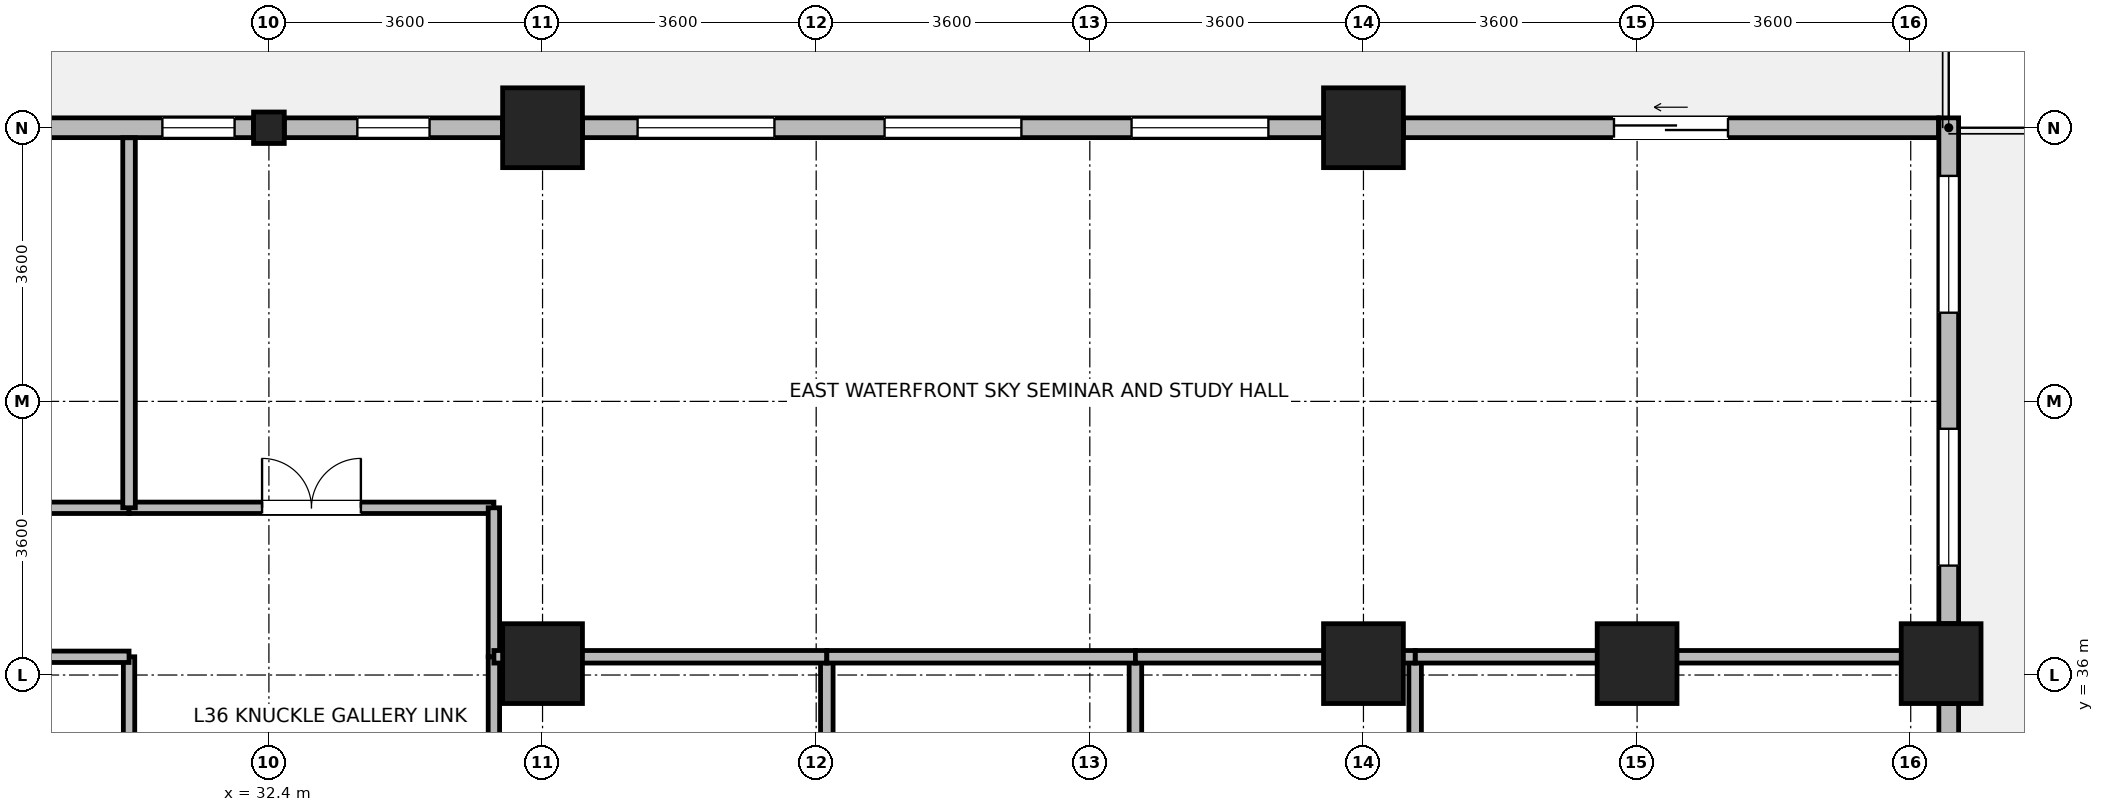
"""IFC4 building model, lengths in metres.
Left out: names, types, materials, properties, quantities, classifications, styles, units other than length and angle.
Written with IfcOpenShell. Run it as: python <this file> out.ifc"""

import sys

from ifc_helpers import new_model, si_unit, direction, frame, frame_2d, origin, origin_2d, place, context, subcontext, project, spatial, rectangle, i_section, extrude, source, transform, mapped, element, fill, save


model = new_model("IFC4")
c1 = context("Model", 3, precision=1e-05, world=origin(), true_north=direction((0.0, 1.0)))
c2 = subcontext(c1, "Body", "Model", "MODEL_VIEW")
j1 = project(units=[si_unit("LENGTHUNIT", "METRE"), si_unit("PLANEANGLEUNIT", "RADIAN")], contexts=[c1])
p1 = place(None, origin())
s1 = spatial("IfcSite", under=j1, at=p1, CompositionType="ELEMENT")
p2 = place(p1, origin())
s2 = spatial("IfcBuilding", under=s1, at=p2, CompositionType="ELEMENT")
p3 = place(p2, frame((0.0, 0.0, 143.9)))
s3 = spatial("IfcBuildingStorey", under=s2, at=p3, CompositionType="ELEMENT", Elevation=143.9)
m1 = source(origin(), c2, "Body", "SweptSolid", [
    extrude(rectangle(XDim=1.05, YDim=1.05, at=origin_2d()), origin(), (0.0, 0.0, 1.0), 3.7),
])
for number, where, z_axis, x_axis in (
    (1, (36.0, 43.2, 0.0), (0.0, 0.0, 1.0), (1.0, 0.0, 0.0)),
    (2, (36.0, 36.15, 0.0), (0.0, 0.0, 1.0), (1.0, 0.0, 0.0)),
    (3, (46.8, 36.15, 0.0), (0.0, 0.0, 1.0), (1.0, 0.0, 0.0)),
    (4, (46.8, 43.2, 0.0), (0.0, 0.0, 1.0), (1.0, 0.0, 0.0)),
    (5, (50.4, 36.15, 0.0), (0.0, 0.0, 1.0), (1.0, 0.0, 0.0)),
    (6, (54.4, 36.15, 0.0), (0.0, 0.0, 1.0), (1.0, 0.0, 0.0)),
):
    element("IfcColumn", number, at=place(p3, frame(where, z_axis=z_axis, x_axis=x_axis)), inside=s3, PredefinedType="COLUMN", context=c2, shape_type="MappedRepresentation", body=[
        mapped(m1, transform((0.0, 0.0, 0.0), x_axis=(1.0, 0.0, 0.0), y_axis=(0.0, 1.0, 0.0), z_axis=(0.0, 0.0, 1.0), scale=1.0)),
    ])
m2 = source(origin(), c2, "Body", "SweptSolid", [
    extrude(i_section(OverallWidth=0.404, OverallDepth=0.414, WebThickness=0.021, FlangeThickness=0.028, FilletRadius=0.015, at=origin_2d()), origin(), (0.0, 0.0, 1.0), 3.7),
])
p4 = place(p3, frame((32.4, 43.2, 0.0), z_axis=(0.0, 0.0, 1.0), x_axis=(1.0, 0.0, 0.0)))
e7 = element("IfcColumn", 7, at=p4, inside=s3, PredefinedType="COLUMN", context=c2, shape_type="MappedRepresentation", body=[
    mapped(m2, transform((0.0, 0.0, 0.0), x_axis=(1.0, 0.0, 0.0), y_axis=(0.0, 1.0, 0.0), z_axis=(0.0, 0.0, 1.0), scale=1.0)),
])
p5 = place(p3, frame((54.5, 35.624, 0.0), z_axis=(0.0, 0.0, 1.0), x_axis=(0.0, -1.0, 0.0)))
e8 = element("IfcWall", 8, at=p5, inside=s3, PredefinedType="STANDARD", context=c2, shape_type="SweptSolid", body=[
    extrude(rectangle(XDim=6.448, YDim=0.26, at=frame_2d((3.224, 0.0))), origin(), (0.0, 0.0, 1.0), 2.99),
])
p6 = place(p5, frame((0.712, 0.0, 0.85)))
e9 = element("IfcOpeningElement", 9, at=p6, cuts=e8, PredefinedType="OPENING", context=c2, shape_type="SweptSolid", body=[
    extrude(rectangle(XDim=1.8, YDim=1.85, at=frame_2d((0.9, 0.925))), frame((0.0, 0.14, 0.0), z_axis=(0.0, -1.0, 0.0), x_axis=(1.0, 0.0, 0.0)), (0.0, 0.0, 1.0), 0.28),
])
p7 = place(p5, frame((3.936, 0.0, 0.85)))
e10 = element("IfcOpeningElement", 10, at=p7, cuts=e8, PredefinedType="OPENING", context=c2, shape_type="SweptSolid", body=[
    extrude(rectangle(XDim=1.8, YDim=1.85, at=frame_2d((0.9, 0.925))), frame((0.0, 0.14, 0.0), z_axis=(0.0, -1.0, 0.0), x_axis=(1.0, 0.0, 0.0)), (0.0, 0.0, 1.0), 0.28),
])
p8 = place(p3, frame((54.5, 43.33, 0.0), z_axis=(0.0, 0.0, 1.0), x_axis=(0.0, -1.0, 0.0)))
e11 = element("IfcWall", 11, at=p8, inside=s3, PredefinedType="STANDARD", context=c2, shape_type="SweptSolid", body=[
    extrude(rectangle(XDim=6.654, YDim=0.26, at=frame_2d((3.327, 0.0))), origin(), (0.0, 0.0, 1.0), 3.44),
])
p9 = place(p8, frame((0.763, 0.0, 0.85)))
e12 = element("IfcOpeningElement", 12, at=p9, cuts=e11, PredefinedType="OPENING", context=c2, shape_type="SweptSolid", body=[
    extrude(rectangle(XDim=1.8, YDim=1.85, at=frame_2d((0.9, 0.925))), frame((0.0, 0.14, 0.0), z_axis=(0.0, -1.0, 0.0), x_axis=(1.0, 0.0, 0.0)), (0.0, 0.0, 1.0), 0.28),
])
p10 = place(p8, frame((4.091, 0.0, 0.85)))
e13 = element("IfcOpeningElement", 13, at=p10, cuts=e11, PredefinedType="OPENING", context=c2, shape_type="SweptSolid", body=[
    extrude(rectangle(XDim=1.8, YDim=1.85, at=frame_2d((0.9, 0.925))), frame((0.0, 0.14, 0.0), z_axis=(0.0, -1.0, 0.0), x_axis=(1.0, 0.0, 0.0)), (0.0, 0.0, 1.0), 0.28),
])
p11 = place(p3, frame((47.326, 43.2, 0.0), z_axis=(0.0, 0.0, 1.0), x_axis=(1.0, 0.0, 0.0)))
e14 = element("IfcWall", 14, at=p11, inside=s3, PredefinedType="STANDARD", context=c2, shape_type="SweptSolid", body=[
    extrude(rectangle(XDim=7.039, YDim=0.26, at=frame_2d((3.52, 0.0))), origin(), (0.0, 0.0, 1.0), 3.44),
])
p12 = place(p11, frame((2.77, 0.0, 0.0)))
e15 = element("IfcOpeningElement", 15, at=p12, cuts=e14, PredefinedType="OPENING", context=c2, shape_type="SweptSolid", body=[
    extrude(rectangle(XDim=1.5, YDim=2.15, at=frame_2d((0.75, 1.075))), frame((0.0, 0.14, 0.0), z_axis=(0.0, -1.0, 0.0), x_axis=(1.0, 0.0, 0.0)), (0.0, 0.0, 1.0), 0.28),
])
p13 = place(p3, frame((36.526, 43.2, 0.0), z_axis=(0.0, 0.0, 1.0), x_axis=(1.0, 0.0, 0.0)))
e16 = element("IfcWall", 16, at=p13, inside=s3, PredefinedType="STANDARD", context=c2, shape_type="SweptSolid", body=[
    extrude(rectangle(XDim=9.748, YDim=0.26, at=frame_2d((4.874, 0.0))), origin(), (0.0, 0.0, 1.0), 2.99),
])
p14 = place(p13, frame((0.725, 0.0, 0.85)))
e17 = element("IfcOpeningElement", 17, at=p14, cuts=e16, PredefinedType="OPENING", context=c2, shape_type="SweptSolid", body=[
    extrude(rectangle(XDim=1.8, YDim=1.85, at=frame_2d((0.9, 0.925))), frame((0.0, 0.14, 0.0), z_axis=(0.0, -1.0, 0.0), x_axis=(1.0, 0.0, 0.0)), (0.0, 0.0, 1.0), 0.28),
])
p15 = place(p13, frame((3.974, 0.0, 0.85)))
e18 = element("IfcOpeningElement", 18, at=p15, cuts=e16, PredefinedType="OPENING", context=c2, shape_type="SweptSolid", body=[
    extrude(rectangle(XDim=1.8, YDim=1.85, at=frame_2d((0.9, 0.925))), frame((0.0, 0.14, 0.0), z_axis=(0.0, -1.0, 0.0), x_axis=(1.0, 0.0, 0.0)), (0.0, 0.0, 1.0), 0.28),
])
p16 = place(p13, frame((7.223, 0.0, 0.85)))
e19 = element("IfcOpeningElement", 19, at=p16, cuts=e16, PredefinedType="OPENING", context=c2, shape_type="SweptSolid", body=[
    extrude(rectangle(XDim=1.8, YDim=1.85, at=frame_2d((0.9, 0.925))), frame((0.0, 0.14, 0.0), z_axis=(0.0, -1.0, 0.0), x_axis=(1.0, 0.0, 0.0)), (0.0, 0.0, 1.0), 0.28),
])
p17 = place(p3, frame((32.603, 43.2, 0.0), z_axis=(0.0, 0.0, 1.0), x_axis=(1.0, 0.0, 0.0)))
e20 = element("IfcWall", 20, at=p17, inside=s3, PredefinedType="STANDARD", context=c2, shape_type="SweptSolid", body=[
    extrude(rectangle(XDim=2.871, YDim=0.26, at=frame_2d((1.436, 0.0))), origin(), (0.0, 0.0, 1.0), 2.99),
])
p18 = place(p17, frame((0.96, 0.0, 0.85)))
e21 = element("IfcOpeningElement", 21, at=p18, cuts=e20, PredefinedType="OPENING", context=c2, shape_type="SweptSolid", body=[
    extrude(rectangle(XDim=0.95, YDim=1.75, at=frame_2d((0.475, 0.875))), frame((0.0, 0.14, 0.0), z_axis=(0.0, -1.0, 0.0), x_axis=(1.0, 0.0, 0.0)), (0.0, 0.0, 1.0), 0.28),
])
p19 = place(p3, frame((29.326, 43.2, 0.0), z_axis=(0.0, 0.0, 1.0), x_axis=(1.0, 0.0, 0.0)))
e22 = element("IfcWall", 22, at=p19, inside=s3, PredefinedType="STANDARD", context=c2, shape_type="SweptSolid", body=[
    extrude(rectangle(XDim=2.871, YDim=0.26, at=frame_2d((1.436, 0.0))), origin(), (0.0, 0.0, 1.0), 2.99),
])
p20 = place(p19, frame((1.673, 0.0, 0.85)))
e23 = element("IfcOpeningElement", 23, at=p20, cuts=e22, PredefinedType="OPENING", context=c2, shape_type="SweptSolid", body=[
    extrude(rectangle(XDim=0.95, YDim=1.75, at=frame_2d((0.475, 0.875))), frame((0.0, 0.14, 0.0), z_axis=(0.0, -1.0, 0.0), x_axis=(1.0, 0.0, 0.0)), (0.0, 0.0, 1.0), 0.28),
])
p21 = place(p3, frame((35.36, 28.56, 0.0), z_axis=(0.0, 0.0, 1.0), x_axis=(0.0, 1.0, 0.0)))
e24 = element("IfcWall", 24, at=p21, inside=s3, PredefinedType="PARTITIONING", context=c2, shape_type="SweptSolid", body=[
    extrude(rectangle(XDim=7.68, YDim=0.15, at=frame_2d((3.84, 0.0))), origin(), (0.0, 0.0, 1.0), 3.44),
])
p22 = place(p21, frame((3.19, 0.0, 0.0)))
e25 = element("IfcOpeningElement", 25, at=p22, cuts=e24, PredefinedType="OPENING", context=c2, shape_type="SweptSolid", body=[
    extrude(rectangle(XDim=1.3, YDim=2.12, at=frame_2d((0.65, 1.06))), frame((0.0, 0.085, 0.0), z_axis=(0.0, -1.0, 0.0), x_axis=(1.0, 0.0, 0.0)), (0.0, 0.0, 1.0), 0.17),
])
p23 = place(p3, frame((23.48, 38.2, 0.0), z_axis=(0.0, 0.0, 1.0), x_axis=(1.0, 0.0, 0.0)))
e26 = element("IfcWall", 26, at=p23, inside=s3, PredefinedType="PARTITIONING", context=c2, shape_type="SweptSolid", body=[
    extrude(rectangle(XDim=7.08, YDim=0.15, at=frame_2d((3.54, 0.0))), origin(), (0.0, 0.0, 1.0), 3.44),
])
p24 = place(p23, frame((2.89, 0.0, 0.0)))
e27 = element("IfcOpeningElement", 27, at=p24, cuts=e26, PredefinedType="OPENING", context=c2, shape_type="SweptSolid", body=[
    extrude(rectangle(XDim=1.3, YDim=2.12, at=frame_2d((0.65, 1.06))), frame((0.0, 0.085, 0.0), z_axis=(0.0, -1.0, 0.0), x_axis=(1.0, 0.0, 0.0)), (0.0, 0.0, 1.0), 0.17),
])
p25 = place(p3, frame((30.56, 38.2, 0.0), z_axis=(0.0, 0.0, 1.0), x_axis=(1.0, 0.0, 0.0)))
e28 = element("IfcWall", 28, at=p25, inside=s3, PredefinedType="PARTITIONING", context=c2, shape_type="SweptSolid", body=[
    extrude(rectangle(XDim=4.8, YDim=0.15, at=frame_2d((2.4, 0.0))), origin(), (0.0, 0.0, 1.0), 3.44),
])
p26 = place(p25, frame((1.75, 0.0, 0.0)))
e29 = element("IfcOpeningElement", 29, at=p26, cuts=e28, PredefinedType="OPENING", context=c2, shape_type="SweptSolid", body=[
    extrude(rectangle(XDim=1.3, YDim=2.12, at=frame_2d((0.65, 1.06))), frame((0.0, 0.085, 0.0), z_axis=(0.0, -1.0, 0.0), x_axis=(1.0, 0.0, 0.0)), (0.0, 0.0, 1.0), 0.17),
])
p27 = place(p3, frame((30.56, 32.4, 0.0), z_axis=(0.0, 0.0, 1.0), x_axis=(0.0, 1.0, 0.0)))
e30 = element("IfcWall", 30, at=p27, inside=s3, PredefinedType="PARTITIONING", context=c2, shape_type="SweptSolid", body=[
    extrude(rectangle(XDim=3.84, YDim=0.15, at=frame_2d((1.92, 0.0))), origin(), (0.0, 0.0, 1.0), 3.44),
])
p28 = place(p27, frame((1.27, 0.0, 0.0)))
e31 = element("IfcOpeningElement", 31, at=p28, cuts=e30, PredefinedType="OPENING", context=c2, shape_type="SweptSolid", body=[
    extrude(rectangle(XDim=1.3, YDim=2.12, at=frame_2d((0.65, 1.06))), frame((0.0, 0.085, 0.0), z_axis=(0.0, -1.0, 0.0), x_axis=(1.0, 0.0, 0.0)), (0.0, 0.0, 1.0), 0.17),
])
p29 = place(p3, frame((35.36, 36.24, 0.0), z_axis=(0.0, 0.0, 1.0), x_axis=(0.0, 1.0, 0.0)))
e32 = element("IfcWall", 32, at=p29, inside=s3, PredefinedType="PARTITIONING", context=c2, shape_type="SweptSolid", body=[
    extrude(rectangle(XDim=1.96, YDim=0.15, at=frame_2d((0.98, 0.0))), origin(), (0.0, 0.0, 1.0), 3.44),
])
p30 = place(p3, frame((29.325, 36.24, 0.0), z_axis=(0.0, 0.0, 1.0), x_axis=(1.0, 0.0, 0.0)))
e33 = element("IfcWall", 33, at=p30, inside=s3, PredefinedType="PARTITIONING", context=c2, shape_type="SweptSolid", body=[
    extrude(rectangle(XDim=1.235, YDim=0.15, at=frame_2d((0.618, 0.0))), origin(), (0.0, 0.0, 1.0), 2.84),
])
for number, where, z_axis, x_axis in (
    (34, (39.74, 28.56, 0.0), (0.0, 0.0, 1.0), (0.0, 1.0, 0.0)),
    (35, (43.8, 28.56, 0.0), (0.0, 0.0, 1.0), (0.0, 1.0, 0.0)),
    (36, (47.48, 28.56, 0.0), (0.0, 0.0, 1.0), (0.0, 1.0, 0.0)),
):
    element("IfcWall", number, at=place(p3, frame(where, z_axis=z_axis, x_axis=x_axis)), inside=s3, PredefinedType="PARTITIONING", context=c2, shape_type="SweptSolid", body=[
        extrude(rectangle(XDim=7.68, YDim=0.165, at=frame_2d((3.84, 0.0))), origin(), (0.0, 0.0, 1.0), 3.44),
    ])
p31 = place(p3, frame((47.48, 36.24, 0.0), z_axis=(0.0, 0.0, 1.0), x_axis=(1.0, 0.0, 0.0)))
e37 = element("IfcWall", 37, at=p31, inside=s3, PredefinedType="PARTITIONING", context=c2, shape_type="SweptSolid", body=[
    extrude(rectangle(XDim=6.888, YDim=0.165, at=frame_2d((3.444, 0.0))), origin(), (0.0, 0.0, 1.0), 2.84),
])
p32 = place(p3, frame((30.56, 38.2, 0.0), z_axis=(0.0, 0.0, 1.0), x_axis=(0.0, 1.0, 0.0)))
e38 = element("IfcWall", 38, at=p32, inside=s3, PredefinedType="PARTITIONING", context=c2, shape_type="SweptSolid", body=[
    extrude(rectangle(XDim=4.868, YDim=0.165, at=frame_2d((2.434, 0.0))), origin(), (0.0, 0.0, 1.0), 3.44),
])
p33 = place(p3, frame((35.36, 36.24, 0.0), z_axis=(0.0, 0.0, 1.0), x_axis=(1.0, 0.0, 0.0)))
e39 = element("IfcWall", 39, at=p33, inside=s3, PredefinedType="PARTITIONING", context=c2, shape_type="SweptSolid", body=[
    extrude(rectangle(XDim=4.38, YDim=0.165, at=frame_2d((2.19, 0.0))), origin(), (0.0, 0.0, 1.0), 2.84),
])
p34 = place(p3, frame((39.74, 36.24, 0.0), z_axis=(0.0, 0.0, 1.0), x_axis=(1.0, 0.0, 0.0)))
e40 = element("IfcWall", 40, at=p34, inside=s3, PredefinedType="PARTITIONING", context=c2, shape_type="SweptSolid", body=[
    extrude(rectangle(XDim=4.06, YDim=0.165, at=frame_2d((2.03, 0.0))), origin(), (0.0, 0.0, 1.0), 2.84),
])
p35 = place(p3, frame((43.8, 36.24, 0.0), z_axis=(0.0, 0.0, 1.0), x_axis=(1.0, 0.0, 0.0)))
e41 = element("IfcWall", 41, at=p35, inside=s3, PredefinedType="PARTITIONING", context=c2, shape_type="SweptSolid", body=[
    extrude(rectangle(XDim=3.68, YDim=0.165, at=frame_2d((1.84, 0.0))), origin(), (0.0, 0.0, 1.0), 2.84),
])
p36 = place(p9, origin())
e42 = element("IfcWindow", 42, at=p36, inside=s3, PartitioningType="SINGLE_PANEL", PredefinedType="WINDOW", context=c2, shape_type="SweptSolid", body=[
    extrude(rectangle(XDim=1.8, YDim=1.85, at=frame_2d((0.9, 0.925))), frame((0.0, 0.03, 0.0), z_axis=(0.0, -1.0, 0.0), x_axis=(1.0, 0.0, 0.0)), (0.0, 0.0, 1.0), 0.06),
])
fill(e12, e42)
p37 = place(p10, origin())
e43 = element("IfcWindow", 43, at=p37, inside=s3, PartitioningType="SINGLE_PANEL", PredefinedType="WINDOW", context=c2, shape_type="SweptSolid", body=[
    extrude(rectangle(XDim=1.8, YDim=1.85, at=frame_2d((0.9, 0.925))), frame((0.0, 0.03, 0.0), z_axis=(0.0, -1.0, 0.0), x_axis=(1.0, 0.0, 0.0)), (0.0, 0.0, 1.0), 0.06),
])
fill(e13, e43)
p38 = place(p12, origin())
e44 = element("IfcDoor", 44, at=p38, inside=s3, OperationType="SLIDING_TO_LEFT", PredefinedType="DOOR", context=c2, shape_type="SweptSolid", body=[
    extrude(rectangle(XDim=1.5, YDim=2.15, at=frame_2d((0.75, 1.075))), frame((0.0, 0.025, 0.0), z_axis=(0.0, -1.0, 0.0), x_axis=(1.0, 0.0, 0.0)), (0.0, 0.0, 1.0), 0.05),
])
fill(e15, e44)
p39 = place(p14, origin())
e45 = element("IfcWindow", 45, at=p39, inside=s3, PartitioningType="SINGLE_PANEL", PredefinedType="WINDOW", context=c2, shape_type="SweptSolid", body=[
    extrude(rectangle(XDim=1.8, YDim=1.85, at=frame_2d((0.9, 0.925))), frame((0.0, 0.03, 0.0), z_axis=(0.0, -1.0, 0.0), x_axis=(1.0, 0.0, 0.0)), (0.0, 0.0, 1.0), 0.06),
])
fill(e17, e45)
p40 = place(p15, origin())
e46 = element("IfcWindow", 46, at=p40, inside=s3, PartitioningType="SINGLE_PANEL", PredefinedType="WINDOW", context=c2, shape_type="SweptSolid", body=[
    extrude(rectangle(XDim=1.8, YDim=1.85, at=frame_2d((0.9, 0.925))), frame((0.0, 0.03, 0.0), z_axis=(0.0, -1.0, 0.0), x_axis=(1.0, 0.0, 0.0)), (0.0, 0.0, 1.0), 0.06),
])
fill(e18, e46)
p41 = place(p16, origin())
e47 = element("IfcWindow", 47, at=p41, inside=s3, PartitioningType="SINGLE_PANEL", PredefinedType="WINDOW", context=c2, shape_type="SweptSolid", body=[
    extrude(rectangle(XDim=1.8, YDim=1.85, at=frame_2d((0.9, 0.925))), frame((0.0, 0.03, 0.0), z_axis=(0.0, -1.0, 0.0), x_axis=(1.0, 0.0, 0.0)), (0.0, 0.0, 1.0), 0.06),
])
fill(e19, e47)
p42 = place(p18, origin())
e48 = element("IfcWindow", 48, at=p42, inside=s3, PartitioningType="SINGLE_PANEL", PredefinedType="WINDOW", context=c2, shape_type="SweptSolid", body=[
    extrude(rectangle(XDim=0.95, YDim=1.75, at=frame_2d((0.475, 0.875))), frame((0.0, 0.03, 0.0), z_axis=(0.0, -1.0, 0.0), x_axis=(1.0, 0.0, 0.0)), (0.0, 0.0, 1.0), 0.06),
])
fill(e21, e48)
p43 = place(p20, origin())
e49 = element("IfcWindow", 49, at=p43, inside=s3, PartitioningType="SINGLE_PANEL", PredefinedType="WINDOW", context=c2, shape_type="SweptSolid", body=[
    extrude(rectangle(XDim=0.95, YDim=1.75, at=frame_2d((0.475, 0.875))), frame((0.0, 0.03, 0.0), z_axis=(0.0, -1.0, 0.0), x_axis=(1.0, 0.0, 0.0)), (0.0, 0.0, 1.0), 0.06),
])
fill(e23, e49)
p44 = place(p26, origin())
e50 = element("IfcDoor", 50, at=p44, inside=s3, OperationType="DOUBLE_DOOR_SINGLE_SWING", PredefinedType="DOOR", context=c2, shape_type="SweptSolid", body=[
    extrude(rectangle(XDim=1.3, YDim=2.12, at=frame_2d((0.65, 1.06))), frame((0.0, 0.025, 0.0), z_axis=(0.0, -1.0, 0.0), x_axis=(1.0, 0.0, 0.0)), (0.0, 0.0, 1.0), 0.05),
])
fill(e29, e50)
save(model, sys.argv[1])
